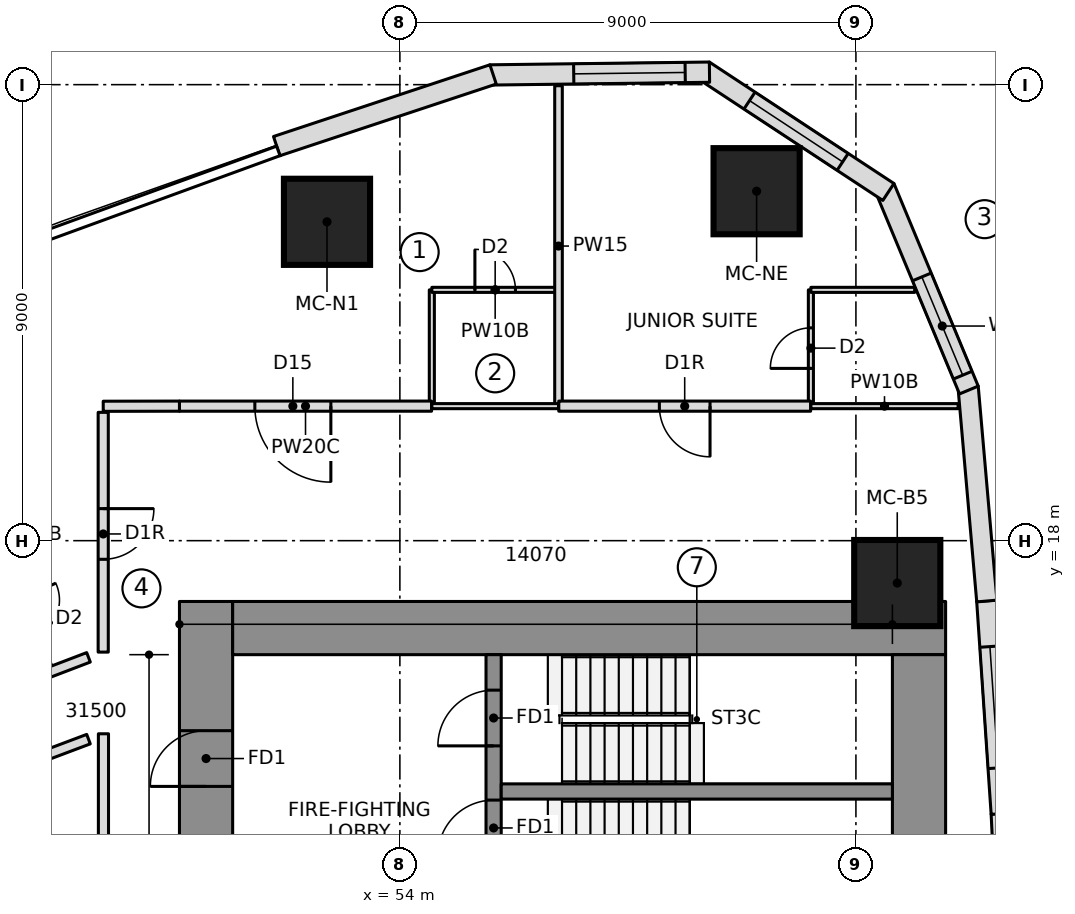
"""IFC4 building model, lengths in metres.
Left out: names, types, materials, properties, quantities, classifications, styles, units other than length and angle.
Written with IfcOpenShell. Run it as: python <this file> out.ifc"""

import sys

from ifc_helpers import new_model, si_unit, direction, frame, frame_2d, origin, origin_2d, place, context, subcontext, project, spatial, polyline, rectangle, outline, extrude, element, fill, save


model = new_model("IFC4")
c1 = context("Model", 3, precision=1e-05, world=origin(), true_north=direction((0.0, 1.0)))
c2 = subcontext(c1, "Body", "Model", "MODEL_VIEW")
j1 = project(units=[si_unit("LENGTHUNIT", "METRE"), si_unit("PLANEANGLEUNIT", "RADIAN")], contexts=[c1])
p1 = place(None, origin())
s1 = spatial("IfcSite", under=j1, at=p1, CompositionType="ELEMENT")
p2 = place(p1, origin())
s2 = spatial("IfcBuilding", under=s1, at=p2, CompositionType="ELEMENT")
p3 = place(p2, frame((0.0, 0.0, 106.2)))
s3 = spatial("IfcBuildingStorey", under=s2, at=p3, CompositionType="ELEMENT", Elevation=106.2)
p4 = place(p3, frame((50.175, 6.65, 0.0), z_axis=(0.0, 0.0, 1.0), x_axis=(0.0, 1.0, 0.0)))
e1 = element("IfcWall", 1, at=p4, inside=s3, PredefinedType="SHEAR", context=c2, shape_type="SweptSolid", body=[
    extrude(rectangle(XDim=10.15, YDim=1.05, at=frame_2d((5.075, 0.0))), origin(), (0.0, 0.0, 1.0), 3.55),
])
p5 = place(p4, frame((6.5, 0.0, 0.0)))
e2 = element("IfcOpeningElement", 2, at=p5, cuts=e1, PredefinedType="OPENING", context=c2, shape_type="SweptSolid", body=[
    extrude(rectangle(XDim=1.1, YDim=2.1, at=frame_2d((0.55, 1.05))), frame((0.0, 0.535, 0.0), z_axis=(0.0, -1.0, 0.0), x_axis=(1.0, 0.0, 0.0)), (0.0, 0.0, 1.0), 1.07),
])
p6 = place(p3, frame((50.7, 16.275, 0.0), z_axis=(0.0, 0.0, 1.0), x_axis=(1.0, 0.0, 0.0)))
e3 = element("IfcWall", 3, at=p6, inside=s3, PredefinedType="SHEAR", context=c2, shape_type="SweptSolid", body=[
    extrude(rectangle(XDim=14.07, YDim=1.05, at=frame_2d((7.035, 0.0))), origin(), (0.0, 0.0, 1.0), 3.55),
])
p7 = place(p3, frame((64.245, 9.389, 0.0), z_axis=(0.0, 0.0, 1.0), x_axis=(0.0, 1.0, 0.0)))
e4 = element("IfcWall", 4, at=p7, inside=s3, PredefinedType="SHEAR", context=c2, shape_type="SweptSolid", body=[
    extrude(rectangle(XDim=6.361, YDim=1.05, at=frame_2d((3.181, 0.0))), origin(), (0.0, 0.0, 1.0), 3.55),
])
p8 = place(p3, frame((55.85, 10.35, 0.0), z_axis=(0.0, 0.0, 1.0), x_axis=(0.0, 1.0, 0.0)))
e5 = element("IfcWall", 5, at=p8, inside=s3, PredefinedType="SHEAR", context=c2, shape_type="SweptSolid", body=[
    extrude(rectangle(XDim=5.4, YDim=0.3, at=frame_2d((2.7, 0.0))), origin(), (0.0, 0.0, 1.0), 3.55),
])
p9 = place(p8, frame((1.43, 0.0, 0.0)))
e6 = element("IfcOpeningElement", 6, at=p9, cuts=e5, PredefinedType="OPENING", context=c2, shape_type="SweptSolid", body=[
    extrude(rectangle(XDim=1.1, YDim=2.1, at=frame_2d((0.55, 1.05))), frame((0.0, 0.16, 0.0), z_axis=(0.0, -1.0, 0.0), x_axis=(1.0, 0.0, 0.0)), (0.0, 0.0, 1.0), 0.32),
])
p10 = place(p8, frame((3.6, 0.0, 0.0)))
e7 = element("IfcOpeningElement", 7, at=p10, cuts=e5, PredefinedType="OPENING", context=c2, shape_type="SweptSolid", body=[
    extrude(rectangle(XDim=1.1, YDim=2.1, at=frame_2d((0.55, 1.05))), frame((0.0, 0.16, 0.0), z_axis=(0.0, -1.0, 0.0), x_axis=(1.0, 0.0, 0.0)), (0.0, 0.0, 1.0), 0.32),
])
p11 = place(p3, frame((56.0, 13.05, 0.0), z_axis=(0.0, 0.0, 1.0), x_axis=(1.0, 0.0, 0.0)))
e8 = element("IfcWall", 8, at=p11, inside=s3, PredefinedType="SHEAR", context=c2, shape_type="SweptSolid", body=[
    extrude(rectangle(XDim=7.72, YDim=0.3, at=frame_2d((3.86, 0.0))), origin(), (0.0, 0.0, 1.0), 3.55),
])
for number, where, z_axis, x_axis in (
    (9, (63.816, 17.164, 0.0), (0.0, 0.0, 1.0), (1.0, 0.0, 0.0)),
    (10, (61.04, 24.897, 0.0), (0.0, 0.0, 1.0), (1.0, 0.0, 0.0)),
    (11, (52.562, 24.293, 0.0), (0.0, 0.0, 1.0), (1.0, 0.0, 0.0)),
):
    element("IfcColumn", number, at=place(p3, frame(where, z_axis=z_axis, x_axis=x_axis)), inside=s3, PredefinedType="COLUMN", context=c2, shape_type="SweptSolid", body=[
        extrude(rectangle(XDim=1.7, YDim=1.7, at=origin_2d()), origin(), (0.0, 0.0, 1.0), 3.55),
    ])
p12 = place(p3, frame((66.072, 8.412, 0.0), z_axis=(0.0, 0.0, 1.0), x_axis=(-0.048342691508, 0.998830808585, 0.0)))
e12 = element("IfcWall", 12, at=p12, inside=s3, PredefinedType="NOTDEFINED", context=c2, shape_type="SweptSolid", body=[
    extrude(outline(polyline([(-0.002, -0.2), (4.209, -0.2), (4.205, 0.2), (0.002, 0.2), (-0.002, -0.2)])), origin(), (0.0, 0.0, 1.0), 3.25),
])
p13 = place(p3, frame((65.868, 12.614, 0.0), z_axis=(0.0, 0.0, 1.0), x_axis=(-0.067724559895, 0.997704056315, 0.0)))
e13 = element("IfcWall", 13, at=p13, inside=s3, PredefinedType="NOTDEFINED", context=c2, shape_type="SweptSolid", body=[
    extrude(outline(polyline([(-0.002, -0.2), (4.209, -0.2), (4.205, 0.2), (0.002, 0.2), (-0.002, -0.2)])), origin(), (0.0, 0.0, 1.0), 3.25),
])
p14 = place(p13, frame((0.903, 0.0, 0.5)))
e14 = element("IfcOpeningElement", 14, at=p14, cuts=e13, PredefinedType="OPENING", context=c2, shape_type="SweptSolid", body=[
    extrude(rectangle(XDim=2.4, YDim=2.0, at=frame_2d((1.2, 1.0))), frame((0.0, 0.21, 0.0), z_axis=(0.0, -1.0, 0.0), x_axis=(1.0, 0.0, 0.0)), (0.0, 0.0, 1.0), 0.42),
])
p15 = place(p3, frame((65.583, 16.811, 0.0), z_axis=(0.0, 0.0, 1.0), x_axis=(-0.086992730434, 0.996208946382, 0.0)))
e15 = element("IfcWall", 15, at=p15, inside=s3, PredefinedType="NOTDEFINED", context=c2, shape_type="SweptSolid", body=[
    extrude(outline(polyline([(-0.002, -0.2), (4.238, -0.2), (4.176, 0.2), (0.002, 0.2), (-0.002, -0.2)])), origin(), (0.0, 0.0, 1.0), 3.25),
])
p16 = place(p3, frame((65.217, 21.002, 0.0), z_axis=(0.0, 0.0, 1.0), x_axis=(-0.383997751971, 0.923334027577, 0.0)))
e16 = element("IfcWall", 16, at=p16, inside=s3, PredefinedType="NOTDEFINED", context=c2, shape_type="SweptSolid", body=[
    extrude(outline(polyline([(-0.031, -0.2), (4.3, -0.2), (4.177, 0.2), (0.031, 0.2), (-0.031, -0.2)])), origin(), (0.0, 0.0, 1.0), 3.25),
])
p17 = place(p16, frame((0.287, 0.0, 0.6)))
e17 = element("IfcOpeningElement", 17, at=p17, cuts=e16, PredefinedType="OPENING", context=c2, shape_type="SweptSolid", body=[
    extrude(outline(polyline([(0.0, 1.4), (0.08, 1.802), (0.308, 2.142), (0.648, 2.37), (1.05, 2.45), (1.452, 2.37), (1.792, 2.142), (2.02, 1.802), (2.1, 1.4), (2.1, 1.05), (2.02, 0.648), (1.792, 0.308), (1.452, 0.08), (1.05, 0.0), (0.648, 0.08), (0.308, 0.308), (0.08, 0.648), (0.0, 1.05), (0.0, 1.4)])), frame((0.0, 0.21, 0.0), z_axis=(0.0, -1.0, 0.0), x_axis=(1.0, 0.0, 0.0)), (0.0, 0.0, 1.0), 0.42),
])
p18 = place(p3, frame((63.59, 24.916, 0.0), z_axis=(0.0, 0.0, 1.0), x_axis=(-0.835340523653, 0.549732852887, 0.0)))
e18 = element("IfcWall", 18, at=p18, inside=s3, PredefinedType="NOTDEFINED", context=c2, shape_type="SweptSolid", body=[
    extrude(outline(polyline([(-0.061, -0.2), (4.3, -0.2), (4.178, 0.2), (0.061, 0.2), (-0.061, -0.2)])), origin(), (0.0, 0.0, 1.0), 3.25),
])
p19 = place(p18, frame((1.02, 0.0, 0.6)))
e19 = element("IfcOpeningElement", 19, at=p19, cuts=e18, PredefinedType="OPENING", context=c2, shape_type="SweptSolid", body=[
    extrude(outline(polyline([(0.0, 1.35), (0.084, 1.771), (0.322, 2.128), (0.679, 2.366), (1.1, 2.45), (1.521, 2.366), (1.878, 2.128), (2.116, 1.771), (2.2, 1.35), (2.2, 1.1), (2.116, 0.679), (1.878, 0.322), (1.521, 0.084), (1.1, 0.0), (0.679, 0.084), (0.322, 0.322), (0.084, 0.679), (0.0, 1.1), (0.0, 1.35)])), frame((0.0, 0.21, 0.0), z_axis=(0.0, -1.0, 0.0), x_axis=(1.0, 0.0, 0.0)), (0.0, 0.0, 1.0), 0.42),
])
p20 = place(p3, frame((60.049, 27.246, 0.0), z_axis=(0.0, 0.0, 1.0), x_axis=(-0.999919718849, -0.012671063772, 0.0)))
e20 = element("IfcWall", 20, at=p20, inside=s3, PredefinedType="NOTDEFINED", context=c2, shape_type="SweptSolid", body=[
    extrude(outline(polyline([(-0.061, -0.2), (4.27, -0.2), (4.208, 0.2), (0.061, 0.2), (-0.061, -0.2)])), origin(), (0.0, 0.0, 1.0), 3.25),
])
p21 = place(p20, frame((0.418, 0.0, 0.6)))
e21 = element("IfcOpeningElement", 21, at=p21, cuts=e20, PredefinedType="OPENING", context=c2, shape_type="SweptSolid", body=[
    extrude(outline(polyline([(0.0, 1.35), (0.084, 1.771), (0.322, 2.128), (0.679, 2.366), (1.1, 2.45), (1.521, 2.366), (1.878, 2.128), (2.116, 1.771), (2.2, 1.35), (2.2, 1.1), (2.116, 0.679), (1.878, 0.322), (1.521, 0.084), (1.1, 0.0), (0.679, 0.084), (0.322, 0.322), (0.084, 0.679), (0.0, 1.1), (0.0, 1.35)])), frame((0.0, 0.21, 0.0), z_axis=(0.0, -1.0, 0.0), x_axis=(1.0, 0.0, 0.0)), (0.0, 0.0, 1.0), 0.42),
])
p22 = place(p3, frame((55.81, 27.192, 0.0), z_axis=(0.0, 0.0, 1.0), x_axis=(-0.94925004851, -0.314522408429, 0.0)))
e22 = element("IfcWall", 22, at=p22, inside=s3, PredefinedType="NOTDEFINED", context=c2, shape_type="SweptSolid", body=[
    extrude(outline(polyline([(-0.031, -0.2), (4.468, -0.2), (4.468, 0.2), (0.031, 0.2), (-0.031, -0.2)])), origin(), (0.0, 0.0, 1.0), 3.25),
])
p23 = place(p3, frame((54.631, 20.65, 0.0), z_axis=(0.0, 0.0, 1.0), x_axis=(0.0, 1.0, 0.0)))
e23 = element("IfcWall", 23, at=p23, inside=s3, PredefinedType="PARTITIONING", context=c2, shape_type="SweptSolid", body=[
    extrude(rectangle(XDim=2.3, YDim=0.1, at=frame_2d((1.15, 0.0))), origin(), (0.0, 0.0, 1.0), 3.25),
])
p24 = place(p3, frame((54.631, 22.95, 0.0), z_axis=(0.0, 0.0, 1.0), x_axis=(1.0, 0.0, 0.0)))
e24 = element("IfcWall", 24, at=p24, inside=s3, PredefinedType="PARTITIONING", context=c2, shape_type="SweptSolid", body=[
    extrude(rectangle(XDim=2.5, YDim=0.1, at=frame_2d((1.25, 0.0))), origin(), (0.0, 0.0, 1.0), 3.25),
])
p25 = place(p24, frame((0.85, 0.0, 0.0)))
e25 = element("IfcOpeningElement", 25, at=p25, cuts=e24, PredefinedType="OPENING", context=c2, shape_type="SweptSolid", body=[
    extrude(rectangle(XDim=0.8, YDim=2.1, at=frame_2d((0.4, 1.05))), frame((0.0, 0.06, 0.0), z_axis=(0.0, -1.0, 0.0), x_axis=(1.0, 0.0, 0.0)), (0.0, 0.0, 1.0), 0.12),
])
p26 = place(p3, frame((62.111, 20.65, 0.0), z_axis=(0.0, 0.0, 1.0), x_axis=(0.0, 1.0, 0.0)))
e26 = element("IfcWall", 26, at=p26, inside=s3, PredefinedType="PARTITIONING", context=c2, shape_type="SweptSolid", body=[
    extrude(rectangle(XDim=2.3, YDim=0.1, at=frame_2d((1.15, 0.0))), origin(), (0.0, 0.0, 1.0), 3.25),
])
p27 = place(p26, frame((0.75, 0.0, 0.0)))
e27 = element("IfcOpeningElement", 27, at=p27, cuts=e26, PredefinedType="OPENING", context=c2, shape_type="SweptSolid", body=[
    extrude(rectangle(XDim=0.8, YDim=2.1, at=frame_2d((0.4, 1.05))), frame((0.0, 0.06, 0.0), z_axis=(0.0, -1.0, 0.0), x_axis=(1.0, 0.0, 0.0)), (0.0, 0.0, 1.0), 0.12),
])
p28 = place(p3, frame((62.111, 22.95, 0.0), z_axis=(0.0, 0.0, 1.0), x_axis=(1.0, 0.0, 0.0)))
e28 = element("IfcWall", 28, at=p28, inside=s3, PredefinedType="PARTITIONING", context=c2, shape_type="SweptSolid", body=[
    extrude(rectangle(XDim=2.049, YDim=0.1, at=frame_2d((1.025, 0.0))), origin(), (0.0, 0.0, 1.0), 3.25),
])
p29 = place(p3, frame((57.131, 20.65, 0.0), z_axis=(0.0, 0.0, 1.0), x_axis=(0.0, 1.0, 0.0)))
e29 = element("IfcWall", 29, at=p29, inside=s3, PredefinedType="PARTITIONING", context=c2, shape_type="SweptSolid", body=[
    extrude(rectangle(XDim=6.329, YDim=0.15, at=frame_2d((3.165, 0.0))), origin(), (0.0, 0.0, 1.0), 3.25),
])
p30 = place(p3, frame((46.169, 17.509, 0.0), z_axis=(0.0, 0.0, 1.0), x_axis=(0.417409478396, -0.90871850831, 0.0)))
e30 = element("IfcWall", 30, at=p30, inside=s3, PredefinedType="PARTITIONING", context=c2, shape_type="SweptSolid", body=[
    extrude(rectangle(XDim=2.283, YDim=0.1, at=frame_2d((1.142, 0.0))), origin(), (0.0, 0.0, 1.0), 3.25),
])
p31 = place(p30, frame((0.75, 0.0, 0.0)))
e31 = element("IfcOpeningElement", 31, at=p31, cuts=e30, PredefinedType="OPENING", context=c2, shape_type="SweptSolid", body=[
    extrude(rectangle(XDim=0.8, YDim=2.1, at=frame_2d((0.4, 1.05))), frame((0.0, 0.06, 0.0), z_axis=(0.0, -1.0, 0.0), x_axis=(1.0, 0.0, 0.0)), (0.0, 0.0, 1.0), 0.12),
])
p32 = place(p3, frame((54.625, 20.655, 0.0), z_axis=(0.0, 0.0, 1.0), x_axis=(-1.0, 0.0, 0.0)))
e32 = element("IfcWall", 32, at=p32, inside=s3, PredefinedType="PARTITIONING", context=c2, shape_type="SweptSolid", body=[
    extrude(rectangle(XDim=4.976, YDim=0.2, at=frame_2d((2.488, 0.0))), origin(), (0.0, 0.0, 1.0), 3.25),
])
p33 = place(p32, frame((1.988, 0.0, 0.0)))
e33 = element("IfcOpeningElement", 33, at=p33, cuts=e32, PredefinedType="OPENING", context=c2, shape_type="SweptSolid", body=[
    extrude(rectangle(XDim=1.5, YDim=2.1, at=frame_2d((0.75, 1.05))), frame((0.0, 0.11, 0.0), z_axis=(0.0, -1.0, 0.0), x_axis=(1.0, 0.0, 0.0)), (0.0, 0.0, 1.0), 0.22),
])
p34 = place(p3, frame((62.106, 20.655, 0.0), z_axis=(0.0, 0.0, 1.0), x_axis=(-1.0, 0.0, 0.0)))
e34 = element("IfcWall", 34, at=p34, inside=s3, PredefinedType="PARTITIONING", context=c2, shape_type="SweptSolid", body=[
    extrude(rectangle(XDim=4.971, YDim=0.2, at=frame_2d((2.485, 0.0))), origin(), (0.0, 0.0, 1.0), 3.25),
])
p35 = place(p34, frame((1.985, 0.0, 0.0)))
e35 = element("IfcOpeningElement", 35, at=p35, cuts=e34, PredefinedType="OPENING", context=c2, shape_type="SweptSolid", body=[
    extrude(rectangle(XDim=1.0, YDim=2.1, at=frame_2d((0.5, 1.05))), frame((0.0, 0.11, 0.0), z_axis=(0.0, -1.0, 0.0), x_axis=(1.0, 0.0, 0.0)), (0.0, 0.0, 1.0), 0.22),
])
p36 = place(p3, frame((57.131, 20.655, 0.0), z_axis=(0.0, 0.0, 1.0), x_axis=(-1.0, 0.0, 0.0)))
e36 = element("IfcWall", 36, at=p36, inside=s3, PredefinedType="PARTITIONING", context=c2, shape_type="SweptSolid", body=[
    extrude(rectangle(XDim=2.5, YDim=0.1, at=frame_2d((1.25, 0.0))), origin(), (0.0, 0.0, 1.0), 3.25),
])
p37 = place(p3, frame((65.017, 20.655, 0.0), z_axis=(0.0, 0.0, 1.0), x_axis=(-1.0, 0.0, 0.0)))
e37 = element("IfcWall", 37, at=p37, inside=s3, PredefinedType="PARTITIONING", context=c2, shape_type="SweptSolid", body=[
    extrude(rectangle(XDim=2.906, YDim=0.1, at=frame_2d((1.453, 0.0))), origin(), (0.0, 0.0, 1.0), 3.25),
])
p38 = place(p3, frame((47.855, 15.698, 0.0), z_axis=(0.0, 0.0, 1.0), x_axis=(-0.934199537442, -0.35675092746, 0.0)))
e38 = element("IfcWall", 38, at=p38, inside=s3, PredefinedType="PARTITIONING", context=c2, shape_type="SweptSolid", body=[
    extrude(rectangle(XDim=2.982, YDim=0.2, at=frame_2d((1.491, 0.0))), origin(), (0.0, 0.0, 1.0), 3.25),
])
p39 = place(p3, frame((46.696, 13.647, 0.0), z_axis=(0.0, 0.0, 1.0), x_axis=(0.935907269358, 0.352246480696, 0.0)))
e39 = element("IfcWall", 39, at=p39, inside=s3, PredefinedType="PARTITIONING", context=c2, shape_type="SweptSolid", body=[
    extrude(rectangle(XDim=1.239, YDim=0.2, at=frame_2d((0.619, 0.0))), origin(), (0.0, 0.0, 1.0), 3.25),
])
p40 = place(p3, frame((48.15, 14.189, 0.0), z_axis=(0.0, 0.0, 1.0), x_axis=(0.0, -1.0, 0.0)))
e40 = element("IfcWall", 40, at=p40, inside=s3, PredefinedType="PARTITIONING", context=c2, shape_type="SweptSolid", body=[
    extrude(rectangle(XDim=28.377, YDim=0.2, at=frame_2d((14.189, 0.0))), origin(), (0.0, 0.0, 1.0), 3.25),
])
p41 = place(p3, frame((49.65, 20.655, 0.0), z_axis=(0.0, 0.0, 1.0), x_axis=(-0.999998406651, -0.001785131852, 0.0)))
e41 = element("IfcWall", 41, at=p41, inside=s3, PredefinedType="PARTITIONING", context=c2, shape_type="SweptSolid", body=[
    extrude(rectangle(XDim=1.504, YDim=0.2, at=frame_2d((0.752, 0.0))), origin(), (0.0, 0.0, 1.0), 3.25),
])
p42 = place(p3, frame((48.146, 20.532, 0.0), z_axis=(0.0, 0.0, 1.0), x_axis=(-5.1594263e-05, -0.999999998669, 0.0)))
e42 = element("IfcWall", 42, at=p42, inside=s3, PredefinedType="PARTITIONING", context=c2, shape_type="SweptSolid", body=[
    extrude(rectangle(XDim=4.732, YDim=0.2, at=frame_2d((2.366, 0.0))), origin(), (0.0, 0.0, 1.0), 3.25),
])
p43 = place(p42, frame((1.9, 0.0, 0.0)))
e43 = element("IfcOpeningElement", 43, at=p43, cuts=e42, PredefinedType="OPENING", context=c2, shape_type="SweptSolid", body=[
    extrude(rectangle(XDim=1.0, YDim=2.1, at=frame_2d((0.5, 1.05))), frame((0.0, 0.11, 0.0), z_axis=(0.0, -1.0, 0.0), x_axis=(1.0, 0.0, 0.0)), (0.0, 0.0, 1.0), 0.22),
])
p44 = place(p14, origin())
e44 = element("IfcWindow", 44, at=p44, inside=s3, PartitioningType="SINGLE_PANEL", PredefinedType="WINDOW", context=c2, shape_type="SweptSolid", body=[
    extrude(rectangle(XDim=2.4, YDim=2.0, at=frame_2d((1.2, 1.0))), frame((0.0, 0.17, 0.0), z_axis=(0.0, -1.0, 0.0), x_axis=(1.0, 0.0, 0.0)), (0.0, 0.0, 1.0), 0.06),
])
fill(e14, e44)
p45 = place(p17, origin())
e45 = element("IfcWindow", 45, at=p45, inside=s3, PartitioningType="SINGLE_PANEL", PredefinedType="WINDOW", context=c2, shape_type="SweptSolid", body=[
    extrude(outline(polyline([(0.0, 1.4), (0.08, 1.802), (0.308, 2.142), (0.648, 2.37), (1.05, 2.45), (1.452, 2.37), (1.792, 2.142), (2.02, 1.802), (2.1, 1.4), (2.1, 1.05), (2.02, 0.648), (1.792, 0.308), (1.452, 0.08), (1.05, 0.0), (0.648, 0.08), (0.308, 0.308), (0.08, 0.648), (0.0, 1.05), (0.0, 1.4)])), frame((0.0, 0.17, 0.0), z_axis=(0.0, -1.0, 0.0), x_axis=(1.0, 0.0, 0.0)), (0.0, 0.0, 1.0), 0.06),
])
fill(e17, e45)
p46 = place(p19, origin())
e46 = element("IfcWindow", 46, at=p46, inside=s3, PartitioningType="SINGLE_PANEL", PredefinedType="WINDOW", context=c2, shape_type="SweptSolid", body=[
    extrude(outline(polyline([(0.0, 1.35), (0.084, 1.771), (0.322, 2.128), (0.679, 2.366), (1.1, 2.45), (1.521, 2.366), (1.878, 2.128), (2.116, 1.771), (2.2, 1.35), (2.2, 1.1), (2.116, 0.679), (1.878, 0.322), (1.521, 0.084), (1.1, 0.0), (0.679, 0.084), (0.322, 0.322), (0.084, 0.679), (0.0, 1.1), (0.0, 1.35)])), frame((0.0, 0.17, 0.0), z_axis=(0.0, -1.0, 0.0), x_axis=(1.0, 0.0, 0.0)), (0.0, 0.0, 1.0), 0.06),
])
fill(e19, e46)
p47 = place(p21, origin())
e47 = element("IfcWindow", 47, at=p47, inside=s3, PartitioningType="SINGLE_PANEL", PredefinedType="WINDOW", context=c2, shape_type="SweptSolid", body=[
    extrude(outline(polyline([(0.0, 1.35), (0.084, 1.771), (0.322, 2.128), (0.679, 2.366), (1.1, 2.45), (1.521, 2.366), (1.878, 2.128), (2.116, 1.771), (2.2, 1.35), (2.2, 1.1), (2.116, 0.679), (1.878, 0.322), (1.521, 0.084), (1.1, 0.0), (0.679, 0.084), (0.322, 0.322), (0.084, 0.679), (0.0, 1.1), (0.0, 1.35)])), frame((0.0, 0.17, 0.0), z_axis=(0.0, -1.0, 0.0), x_axis=(1.0, 0.0, 0.0)), (0.0, 0.0, 1.0), 0.06),
])
fill(e21, e47)
p48 = place(p25, origin())
e48 = element("IfcDoor", 48, at=p48, inside=s3, OperationType="SINGLE_SWING_LEFT", PredefinedType="DOOR", context=c2, shape_type="SweptSolid", body=[
    extrude(rectangle(XDim=0.8, YDim=2.1, at=frame_2d((0.4, 1.05))), frame((0.0, 0.025, 0.0), z_axis=(0.0, -1.0, 0.0), x_axis=(1.0, 0.0, 0.0)), (0.0, 0.0, 1.0), 0.05),
])
fill(e25, e48)
p49 = place(p27, origin())
e49 = element("IfcDoor", 49, at=p49, inside=s3, OperationType="SINGLE_SWING_LEFT", PredefinedType="DOOR", context=c2, shape_type="SweptSolid", body=[
    extrude(rectangle(XDim=0.8, YDim=2.1, at=frame_2d((0.4, 1.05))), frame((0.0, 0.025, 0.0), z_axis=(0.0, -1.0, 0.0), x_axis=(1.0, 0.0, 0.0)), (0.0, 0.0, 1.0), 0.05),
])
fill(e27, e49)
p50 = place(p33, origin())
e50 = element("IfcDoor", 50, at=p50, inside=s3, OperationType="DOUBLE_DOOR_SINGLE_SWING", PredefinedType="DOOR", context=c2, shape_type="SweptSolid", body=[
    extrude(rectangle(XDim=1.5, YDim=2.1, at=frame_2d((0.75, 1.05))), frame((0.0, 0.025, 0.0), z_axis=(0.0, -1.0, 0.0), x_axis=(1.0, 0.0, 0.0)), (0.0, 0.0, 1.0), 0.05),
])
fill(e33, e50)
p51 = place(p35, origin())
e51 = element("IfcDoor", 51, at=p51, inside=s3, OperationType="SINGLE_SWING_RIGHT", PredefinedType="DOOR", context=c2, shape_type="SweptSolid", body=[
    extrude(rectangle(XDim=1.0, YDim=2.1, at=frame_2d((0.5, 1.05))), frame((0.0, 0.025, 0.0), z_axis=(0.0, -1.0, 0.0), x_axis=(1.0, 0.0, 0.0)), (0.0, 0.0, 1.0), 0.05),
])
fill(e35, e51)
p52 = place(p43, origin())
e52 = element("IfcDoor", 52, at=p52, inside=s3, OperationType="SINGLE_SWING_RIGHT", PredefinedType="DOOR", context=c2, shape_type="SweptSolid", body=[
    extrude(rectangle(XDim=1.0, YDim=2.1, at=frame_2d((0.5, 1.05))), frame((0.0, 0.025, 0.0), z_axis=(0.0, -1.0, 0.0), x_axis=(1.0, 0.0, 0.0)), (0.0, 0.0, 1.0), 0.05),
])
fill(e43, e52)
p53 = place(p9, origin())
e53 = element("IfcDoor", 53, at=p53, inside=s3, OperationType="SINGLE_SWING_RIGHT", PredefinedType="DOOR", context=c2, shape_type="SweptSolid", body=[
    extrude(rectangle(XDim=1.1, YDim=2.1, at=frame_2d((0.55, 1.05))), frame((0.0, 0.025, 0.0), z_axis=(0.0, -1.0, 0.0), x_axis=(1.0, 0.0, 0.0)), (0.0, 0.0, 1.0), 0.05),
])
fill(e6, e53)
p54 = place(p10, origin())
e54 = element("IfcDoor", 54, at=p54, inside=s3, OperationType="SINGLE_SWING_RIGHT", PredefinedType="DOOR", context=c2, shape_type="SweptSolid", body=[
    extrude(rectangle(XDim=1.1, YDim=2.1, at=frame_2d((0.55, 1.05))), frame((0.0, 0.025, 0.0), z_axis=(0.0, -1.0, 0.0), x_axis=(1.0, 0.0, 0.0)), (0.0, 0.0, 1.0), 0.05),
])
fill(e7, e54)
p55 = place(p5, origin())
e55 = element("IfcDoor", 55, at=p55, inside=s3, OperationType="SINGLE_SWING_RIGHT", PredefinedType="DOOR", context=c2, shape_type="SweptSolid", body=[
    extrude(rectangle(XDim=1.1, YDim=2.1, at=frame_2d((0.55, 1.05))), frame((0.0, 0.025, 0.0), z_axis=(0.0, -1.0, 0.0), x_axis=(1.0, 0.0, 0.0)), (0.0, 0.0, 1.0), 0.05),
])
fill(e2, e55)
save(model, sys.argv[1])
